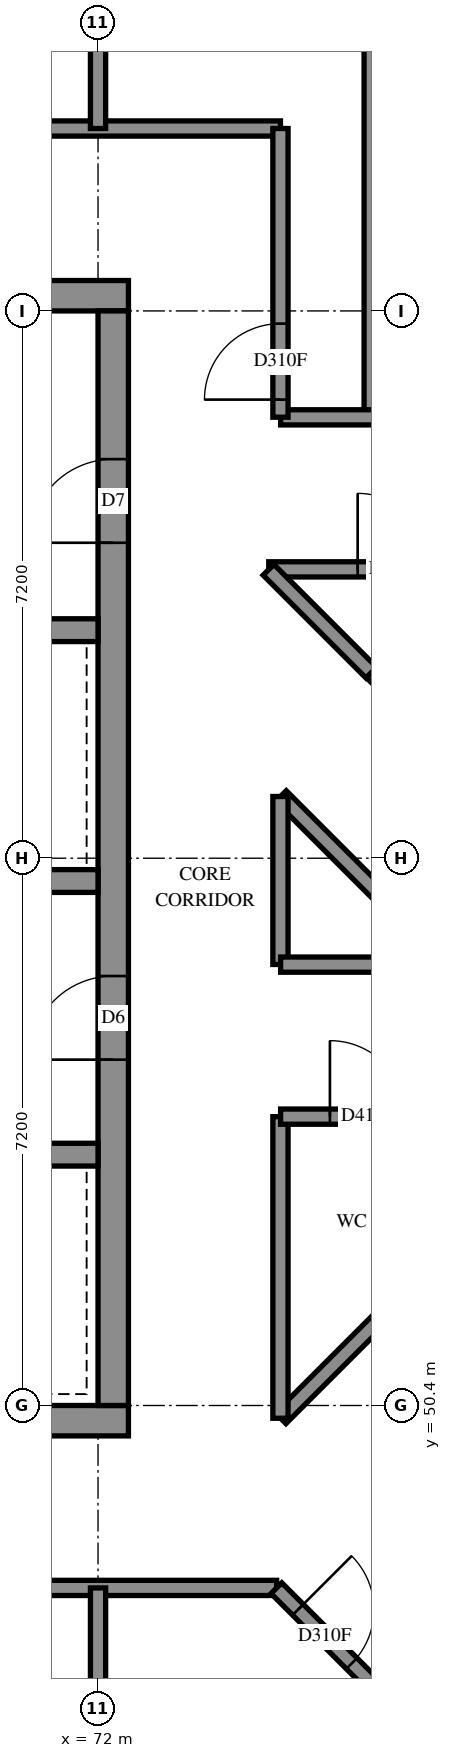
"""IFC4 building model, lengths in metres.
Left out: names, types, materials, properties, quantities, classifications, styles, units other than length and angle.
Written with IfcOpenShell. Run it as: python <this file> out.ifc"""

import sys

from ifc_helpers import new_model, si_unit, direction, frame, frame_2d, origin, place, context, subcontext, project, spatial, rectangle, extrude, element, fill, save


model = new_model("IFC4")
c1 = context("Model", 3, precision=1e-05, world=origin(), true_north=direction((0.0, 1.0)))
c2 = subcontext(c1, "Body", "Model", "MODEL_VIEW")
j1 = project(units=[si_unit("LENGTHUNIT", "METRE"), si_unit("PLANEANGLEUNIT", "RADIAN")], contexts=[c1])
p1 = place(None, origin())
s1 = spatial("IfcSite", under=j1, at=p1, CompositionType="ELEMENT")
p2 = place(p1, origin())
s2 = spatial("IfcBuilding", under=s1, at=p2, CompositionType="ELEMENT")
p3 = place(p2, frame((0.0, 0.0, 250.6)))
s3 = spatial("IfcBuildingStorey", under=s2, at=p3, CompositionType="ELEMENT", Elevation=250.6)
p4 = place(p3, frame((57.2, 50.2, -0.3), z_axis=(0.0, 0.0, 1.0), x_axis=(1.0, 0.0, 0.0)))
e1 = element("IfcWall", 1, at=p4, inside=s3, PredefinedType="SHEAR", context=c2, shape_type="SweptSolid", body=[
    extrude(rectangle(XDim=15.2, YDim=0.4, at=frame_2d((7.6, 0.0))), origin(), (0.0, 0.0, 1.0), 2.7),
])
p5 = place(p3, frame((57.2, 65.0, -0.3), z_axis=(0.0, 0.0, 1.0), x_axis=(1.0, 0.0, 0.0)))
e2 = element("IfcWall", 2, at=p5, inside=s3, PredefinedType="SHEAR", context=c2, shape_type="SweptSolid", body=[
    extrude(rectangle(XDim=15.2, YDim=0.4, at=frame_2d((7.6, 0.0))), origin(), (0.0, 0.0, 1.0), 2.7),
])
p6 = place(p5, frame((10.4, 0.0, 0.3)))
e3 = element("IfcOpeningElement", 3, at=p6, cuts=e2, PredefinedType="OPENING", context=c2, shape_type="SweptSolid", body=[
    extrude(rectangle(XDim=0.8, YDim=2.1, at=frame_2d((0.4, 1.05))), frame((0.0, 0.21, 0.0), z_axis=(0.0, -1.0, 0.0), x_axis=(1.0, 0.0, 0.0)), (0.0, 0.0, 1.0), 0.42),
])
p7 = place(p3, frame((72.2, 50.4, -0.3), z_axis=(0.0, 0.0, 1.0), x_axis=(0.0, 1.0, 0.0)))
e4 = element("IfcWall", 4, at=p7, inside=s3, PredefinedType="SHEAR", context=c2, shape_type="SweptSolid", body=[
    extrude(rectangle(XDim=14.4, YDim=0.4, at=frame_2d((7.2, 0.0))), origin(), (0.0, 0.0, 1.0), 2.7),
])
p8 = place(p7, frame((4.55, 0.0, 0.3)))
e5 = element("IfcOpeningElement", 5, at=p8, cuts=e4, PredefinedType="OPENING", context=c2, shape_type="SweptSolid", body=[
    extrude(rectangle(XDim=1.1, YDim=2.1, at=frame_2d((0.55, 1.05))), frame((0.0, 0.21, 0.0), z_axis=(0.0, -1.0, 0.0), x_axis=(1.0, 0.0, 0.0)), (0.0, 0.0, 1.0), 0.42),
])
p9 = place(p7, frame((11.35, 0.0, 0.3)))
e6 = element("IfcOpeningElement", 6, at=p9, cuts=e4, PredefinedType="OPENING", context=c2, shape_type="SweptSolid", body=[
    extrude(rectangle(XDim=1.1, YDim=2.1, at=frame_2d((0.55, 1.05))), frame((0.0, 0.21, 0.0), z_axis=(0.0, -1.0, 0.0), x_axis=(1.0, 0.0, 0.0)), (0.0, 0.0, 1.0), 0.42),
])
p10 = place(p3, frame((57.6, 53.7, 0.0), z_axis=(0.0, 0.0, 1.0), x_axis=(1.0, 0.0, 0.0)))
e7 = element("IfcWall", 7, at=p10, inside=s3, PredefinedType="SOLIDWALL", context=c2, shape_type="SweptSolid", body=[
    extrude(rectangle(XDim=14.4, YDim=0.3, at=frame_2d((7.2, 0.0))), origin(), (0.0, 0.0, 1.0), 3.1),
])
p11 = place(p10, frame((1.35, 0.0, 0.0)))
e8 = element("IfcOpeningElement", 8, at=p11, cuts=e7, PredefinedType="OPENING", context=c2, shape_type="SweptSolid", body=[
    extrude(rectangle(XDim=0.9, YDim=2.1, at=frame_2d((0.45, 1.05))), frame((0.0, 0.16, 0.0), z_axis=(0.0, -1.0, 0.0), x_axis=(1.0, 0.0, 0.0)), (0.0, 0.0, 1.0), 0.32),
])
p12 = place(p10, frame((4.95, 0.0, 0.0)))
e9 = element("IfcOpeningElement", 9, at=p12, cuts=e7, PredefinedType="OPENING", context=c2, shape_type="SweptSolid", body=[
    extrude(rectangle(XDim=0.9, YDim=2.1, at=frame_2d((0.45, 1.05))), frame((0.0, 0.16, 0.0), z_axis=(0.0, -1.0, 0.0), x_axis=(1.0, 0.0, 0.0)), (0.0, 0.0, 1.0), 0.32),
])
p13 = place(p10, frame((8.55, 0.0, 0.0)))
e10 = element("IfcOpeningElement", 10, at=p13, cuts=e7, PredefinedType="OPENING", context=c2, shape_type="SweptSolid", body=[
    extrude(rectangle(XDim=0.9, YDim=2.1, at=frame_2d((0.45, 1.05))), frame((0.0, 0.16, 0.0), z_axis=(0.0, -1.0, 0.0), x_axis=(1.0, 0.0, 0.0)), (0.0, 0.0, 1.0), 0.32),
])
p14 = place(p10, frame((12.05, 0.0, 0.0)))
e11 = element("IfcOpeningElement", 11, at=p14, cuts=e7, PredefinedType="OPENING", context=c2, shape_type="SweptSolid", body=[
    extrude(rectangle(XDim=1.1, YDim=2.1, at=frame_2d((0.55, 1.05))), frame((0.0, 0.16, 0.0), z_axis=(0.0, -1.0, 0.0), x_axis=(1.0, 0.0, 0.0)), (0.0, 0.0, 1.0), 0.32),
])
p15 = place(p3, frame((57.6, 57.3, 0.0), z_axis=(0.0, 0.0, 1.0), x_axis=(1.0, 0.0, 0.0)))
e12 = element("IfcWall", 12, at=p15, inside=s3, PredefinedType="SOLIDWALL", context=c2, shape_type="SweptSolid", body=[
    extrude(rectangle(XDim=14.4, YDim=0.3, at=frame_2d((7.2, 0.0))), origin(), (0.0, 0.0, 1.0), 3.1),
])
p16 = place(p15, frame((8.55, 0.0, 0.0)))
e13 = element("IfcOpeningElement", 13, at=p16, cuts=e12, PredefinedType="OPENING", context=c2, shape_type="SweptSolid", body=[
    extrude(rectangle(XDim=0.9, YDim=2.1, at=frame_2d((0.45, 1.05))), frame((0.0, 0.16, 0.0), z_axis=(0.0, -1.0, 0.0), x_axis=(1.0, 0.0, 0.0)), (0.0, 0.0, 1.0), 0.32),
])
p17 = place(p15, frame((1.25, 0.0, 0.0)))
e14 = element("IfcOpeningElement", 14, at=p17, cuts=e12, PredefinedType="OPENING", context=c2, shape_type="SweptSolid", body=[
    extrude(rectangle(XDim=1.1, YDim=2.1, at=frame_2d((0.55, 1.05))), frame((0.0, 0.16, 0.0), z_axis=(0.0, -1.0, 0.0), x_axis=(1.0, 0.0, 0.0)), (0.0, 0.0, 1.0), 0.32),
])
p18 = place(p15, frame((4.85, 0.0, 0.0)))
e15 = element("IfcOpeningElement", 15, at=p18, cuts=e12, PredefinedType="OPENING", context=c2, shape_type="SweptSolid", body=[
    extrude(rectangle(XDim=1.1, YDim=2.1, at=frame_2d((0.55, 1.05))), frame((0.0, 0.16, 0.0), z_axis=(0.0, -1.0, 0.0), x_axis=(1.0, 0.0, 0.0)), (0.0, 0.0, 1.0), 0.32),
])
p19 = place(p15, frame((12.05, 0.0, 0.0)))
e16 = element("IfcOpeningElement", 16, at=p19, cuts=e12, PredefinedType="OPENING", context=c2, shape_type="SweptSolid", body=[
    extrude(rectangle(XDim=1.1, YDim=2.1, at=frame_2d((0.55, 1.05))), frame((0.0, 0.16, 0.0), z_axis=(0.0, -1.0, 0.0), x_axis=(1.0, 0.0, 0.0)), (0.0, 0.0, 1.0), 0.32),
])
p20 = place(p3, frame((64.8, 60.6, 0.0), z_axis=(0.0, 0.0, 1.0), x_axis=(1.0, 0.0, 0.0)))
e17 = element("IfcWall", 17, at=p20, inside=s3, PredefinedType="SOLIDWALL", context=c2, shape_type="SweptSolid", body=[
    extrude(rectangle(XDim=7.2, YDim=0.3, at=frame_2d((3.6, 0.0))), origin(), (0.0, 0.0, 1.0), 3.1),
])
p21 = place(p3, frame((55.2, 67.2, 0.0), z_axis=(0.0, 0.0, 1.0), x_axis=(1.0, 0.0, 0.0)))
e18 = element("IfcWall", 18, at=p21, inside=s3, PredefinedType="PARTITIONING", context=c2, shape_type="SweptSolid", body=[
    extrude(rectangle(XDim=19.2, YDim=0.2, at=frame_2d((9.6, 0.0))), origin(), (0.0, 0.0, 1.0), 3.1),
])
p22 = place(p21, frame((6.299, 0.0, 0.0)))
e19 = element("IfcOpeningElement", 19, at=p22, cuts=e18, PredefinedType="OPENING", context=c2, shape_type="SweptSolid", body=[
    extrude(rectangle(XDim=0.9, YDim=2.1, at=frame_2d((0.45, 1.05))), frame((0.0, 0.11, 0.0), z_axis=(0.0, -1.0, 0.0), x_axis=(1.0, 0.0, 0.0)), (0.0, 0.0, 1.0), 0.22),
])
p23 = place(p21, frame((13.65, 0.0, 0.0)))
e20 = element("IfcOpeningElement", 20, at=p23, cuts=e18, PredefinedType="OPENING", context=c2, shape_type="SweptSolid", body=[
    extrude(rectangle(XDim=0.9, YDim=2.1, at=frame_2d((0.45, 1.05))), frame((0.0, 0.11, 0.0), z_axis=(0.0, -1.0, 0.0), x_axis=(1.0, 0.0, 0.0)), (0.0, 0.0, 1.0), 0.22),
])
p24 = place(p3, frame((55.2, 48.0, 0.0), z_axis=(0.0, 0.0, 1.0), x_axis=(1.0, 0.0, 0.0)))
e21 = element("IfcWall", 21, at=p24, inside=s3, PredefinedType="PARTITIONING", context=c2, shape_type="SweptSolid", body=[
    extrude(rectangle(XDim=19.15, YDim=0.2, at=frame_2d((9.575, 0.0))), origin(), (0.0, 0.0, 1.0), 3.1),
])
p25 = place(p24, frame((6.299, 0.0, 0.0)))
e22 = element("IfcOpeningElement", 22, at=p25, cuts=e21, PredefinedType="OPENING", context=c2, shape_type="SweptSolid", body=[
    extrude(rectangle(XDim=0.9, YDim=2.1, at=frame_2d((0.45, 1.05))), frame((0.0, 0.11, 0.0), z_axis=(0.0, -1.0, 0.0), x_axis=(1.0, 0.0, 0.0)), (0.0, 0.0, 1.0), 0.22),
])
p26 = place(p24, frame((13.499, 0.0, 0.0)))
e23 = element("IfcOpeningElement", 23, at=p26, cuts=e21, PredefinedType="OPENING", context=c2, shape_type="SweptSolid", body=[
    extrude(rectangle(XDim=0.9, YDim=2.1, at=frame_2d((0.45, 1.05))), frame((0.0, 0.11, 0.0), z_axis=(0.0, -1.0, 0.0), x_axis=(1.0, 0.0, 0.0)), (0.0, 0.0, 1.0), 0.22),
])
p27 = place(p3, frame((75.6, 63.4, 0.0), z_axis=(0.0, 0.0, 1.0), x_axis=(0.0, 1.0, 0.0)))
e24 = element("IfcWall", 24, at=p27, inside=s3, PredefinedType="PARTITIONING", context=c2, shape_type="SweptSolid", body=[
    extrude(rectangle(XDim=9.412, YDim=0.2, at=frame_2d((4.706, 0.0))), origin(), (0.0, 0.0, 1.0), 3.1),
])
p28 = place(p3, frame((74.401, 50.233, 0.0), z_axis=(0.0, 0.0, 1.0), x_axis=(0.7071067812, 0.7071067812, 0.0)))
e25 = element("IfcWall", 25, at=p28, inside=s3, PredefinedType="PARTITIONING", context=c2, shape_type="SweptSolid", body=[
    extrude(rectangle(XDim=5.609, YDim=0.2, at=frame_2d((2.804, 0.0))), origin(), (0.0, 0.0, 1.0), 3.1),
])
p29 = place(p3, frame((74.246, 61.4, 0.0), z_axis=(0.0, 0.0, 1.0), x_axis=(1.0, 0.0, 0.0)))
e26 = element("IfcWall", 26, at=p29, inside=s3, PredefinedType="PARTITIONING", context=c2, shape_type="SweptSolid", body=[
    extrude(rectangle(XDim=4.954, YDim=0.2, at=frame_2d((2.477, 0.0))), origin(), (0.0, 0.0, 1.0), 3.1),
])
p30 = place(p29, frame((1.17, 0.0, 0.0)))
e27 = element("IfcOpeningElement", 27, at=p30, cuts=e26, PredefinedType="OPENING", context=c2, shape_type="SweptSolid", body=[
    extrude(rectangle(XDim=1.0, YDim=2.1, at=frame_2d((0.5, 1.05))), frame((0.0, 0.11, 0.0), z_axis=(0.0, -1.0, 0.0), x_axis=(1.0, 0.0, 0.0)), (0.0, 0.0, 1.0), 0.22),
])
p31 = place(p3, frame((74.402, 63.4, 0.0), z_axis=(0.0, 0.0, 1.0), x_axis=(1.0, 0.0, 0.0)))
e28 = element("IfcWall", 28, at=p31, inside=s3, PredefinedType="PARTITIONING", context=c2, shape_type="SweptSolid", body=[
    extrude(rectangle(XDim=4.798, YDim=0.2, at=frame_2d((2.399, 0.0))), origin(), (0.0, 0.0, 1.0), 3.1),
])
p32 = place(p31, frame((1.766, 0.0, 0.0)))
e29 = element("IfcOpeningElement", 29, at=p32, cuts=e28, PredefinedType="OPENING", context=c2, shape_type="SweptSolid", body=[
    extrude(rectangle(XDim=1.0, YDim=2.1, at=frame_2d((0.5, 1.05))), frame((0.0, 0.11, 0.0), z_axis=(0.0, -1.0, 0.0), x_axis=(1.0, 0.0, 0.0)), (0.0, 0.0, 1.0), 0.22),
])
p33 = place(p3, frame((74.347, 47.997, 0.0), z_axis=(0.0, 0.0, 1.0), x_axis=(0.7071067812, -0.7071067812, 0.0)))
e30 = element("IfcWall", 30, at=p33, inside=s3, PredefinedType="PARTITIONING", context=c2, shape_type="SweptSolid", body=[
    extrude(rectangle(XDim=4.596, YDim=0.2, at=frame_2d((2.298, 0.0))), origin(), (0.0, 0.0, 1.0), 3.1),
])
p34 = place(p33, frame((0.401, 0.0, 0.0)))
e31 = element("IfcOpeningElement", 31, at=p34, cuts=e30, PredefinedType="OPENING", context=c2, shape_type="SweptSolid", body=[
    extrude(rectangle(XDim=1.0, YDim=2.1, at=frame_2d((0.5, 1.05))), frame((0.0, 0.11, 0.0), z_axis=(0.0, -1.0, 0.0), x_axis=(1.0, 0.0, 0.0)), (0.0, 0.0, 1.0), 0.22),
])
p35 = place(p3, frame((72.0, 43.55, 0.0), z_axis=(0.0, 0.0, 1.0), x_axis=(0.0, 1.0, 0.0)))
e32 = element("IfcWall", 32, at=p35, inside=s3, PredefinedType="PARTITIONING", context=c2, shape_type="SweptSolid", body=[
    extrude(rectangle(XDim=4.45, YDim=0.2, at=frame_2d((2.225, 0.0))), origin(), (0.0, 0.0, 1.0), 3.1),
])
p36 = place(p3, frame((72.0, 67.2, 0.0), z_axis=(0.0, 0.0, 1.0), x_axis=(0.0, 1.0, 0.0)))
e33 = element("IfcWall", 33, at=p36, inside=s3, PredefinedType="PARTITIONING", context=c2, shape_type="SweptSolid", body=[
    extrude(rectangle(XDim=4.346, YDim=0.2, at=frame_2d((2.173, 0.0))), origin(), (0.0, 0.0, 1.0), 3.1),
])
p37 = place(p3, frame((74.4, 50.232, 0.0), z_axis=(0.0, 0.0, 1.0), x_axis=(0.0, 1.0, 0.0)))
e34 = element("IfcWall", 34, at=p37, inside=s3, PredefinedType="PARTITIONING", context=c2, shape_type="SweptSolid", body=[
    extrude(rectangle(XDim=3.968, YDim=0.2, at=frame_2d((1.984, 0.0))), origin(), (0.0, 0.0, 1.0), 3.1),
])
p38 = place(p3, frame((74.402, 54.2, 0.0), z_axis=(0.0, 0.0, 1.0), x_axis=(1.0, 0.0, 0.0)))
e35 = element("IfcWall", 35, at=p38, inside=s3, PredefinedType="PARTITIONING", context=c2, shape_type="SweptSolid", body=[
    extrude(rectangle(XDim=3.966, YDim=0.2, at=frame_2d((1.983, 0.0))), origin(), (0.0, 0.0, 1.0), 3.1),
])
p39 = place(p38, frame((0.649, 0.0, 0.0)))
e36 = element("IfcOpeningElement", 36, at=p39, cuts=e35, PredefinedType="OPENING", context=c2, shape_type="SweptSolid", body=[
    extrude(rectangle(XDim=1.0, YDim=2.1, at=frame_2d((0.5, 1.05))), frame((0.0, 0.11, 0.0), z_axis=(0.0, -1.0, 0.0), x_axis=(1.0, 0.0, 0.0)), (0.0, 0.0, 1.0), 0.22),
])
p40 = place(p3, frame((74.4, 63.402, 0.0), z_axis=(0.0, 0.0, 1.0), x_axis=(0.0, 1.0, 0.0)))
e37 = element("IfcWall", 37, at=p40, inside=s3, PredefinedType="PARTITIONING", context=c2, shape_type="SweptSolid", body=[
    extrude(rectangle(XDim=3.798, YDim=0.2, at=frame_2d((1.899, 0.0))), origin(), (0.0, 0.0, 1.0), 3.1),
])
p41 = place(p40, frame((0.231, 0.0, 0.0)))
e38 = element("IfcOpeningElement", 38, at=p41, cuts=e37, PredefinedType="OPENING", context=c2, shape_type="SweptSolid", body=[
    extrude(rectangle(XDim=1.0, YDim=2.1, at=frame_2d((0.5, 1.05))), frame((0.0, 0.11, 0.0), z_axis=(0.0, -1.0, 0.0), x_axis=(1.0, 0.0, 0.0)), (0.0, 0.0, 1.0), 0.22),
])
p42 = place(p3, frame((74.406, 58.417, 0.0), z_axis=(0.0, 0.0, 1.0), x_axis=(0.7071067812, -0.7071067812, 0.0)))
e39 = element("IfcWall", 39, at=p42, inside=s3, PredefinedType="PARTITIONING", context=c2, shape_type="SweptSolid", body=[
    extrude(rectangle(XDim=3.128, YDim=0.2, at=frame_2d((1.564, 0.0))), origin(), (0.0, 0.0, 1.0), 3.1),
])
for number, where, z_axis, x_axis in (
    (40, (74.4, 56.202, 0.0), (0.0, 0.0, 1.0), (0.0, 1.0, 0.0)),
    (41, (74.402, 56.2, 0.0), (0.0, 0.0, 1.0), (1.0, 0.0, 0.0)),
):
    element("IfcWall", number, at=place(p3, frame(where, z_axis=z_axis, x_axis=x_axis)), inside=s3, PredefinedType="PARTITIONING", context=c2, shape_type="SweptSolid", body=[
        extrude(rectangle(XDim=2.21, YDim=0.2, at=frame_2d((1.105, 0.0))), origin(), (0.0, 0.0, 1.0), 3.1),
    ])
p43 = place(p3, frame((74.243, 61.395, 0.0), z_axis=(0.0, 0.0, 1.0), x_axis=(0.7071067812, -0.7071067812, 0.0)))
e42 = element("IfcWall", 42, at=p43, inside=s3, PredefinedType="PARTITIONING", context=c2, shape_type="SweptSolid", body=[
    extrude(rectangle(XDim=1.915, YDim=0.2, at=frame_2d((0.957, 0.0))), origin(), (0.0, 0.0, 1.0), 3.1),
])
p44 = place(p3, frame((75.602, 60.046, 0.0), z_axis=(0.0, 0.0, 1.0), x_axis=(0.7063318703, -0.7078808437, 0.0)))
e43 = element("IfcWall", 43, at=p44, inside=s3, PredefinedType="PARTITIONING", context=c2, shape_type="SweptSolid", body=[
    extrude(rectangle(XDim=1.291, YDim=0.2, at=frame_2d((0.646, 0.0))), origin(), (0.0, 0.0, 1.0), 3.1),
])
p45 = place(p8, origin())
e44 = element("IfcDoor", 44, at=p45, inside=s3, OperationType="DOUBLE_DOOR_SINGLE_SWING", PredefinedType="DOOR", context=c2, shape_type="SweptSolid", body=[
    extrude(rectangle(XDim=1.1, YDim=2.1, at=frame_2d((0.55, 1.05))), frame((0.0, 0.025, 0.0), z_axis=(0.0, -1.0, 0.0), x_axis=(1.0, 0.0, 0.0)), (0.0, 0.0, 1.0), 0.05),
])
fill(e5, e44)
p46 = place(p9, origin())
e45 = element("IfcDoor", 45, at=p46, inside=s3, OperationType="SINGLE_SWING_RIGHT", PredefinedType="DOOR", context=c2, shape_type="SweptSolid", body=[
    extrude(rectangle(XDim=1.1, YDim=2.1, at=frame_2d((0.55, 1.05))), frame((0.0, 0.025, 0.0), z_axis=(0.0, -1.0, 0.0), x_axis=(1.0, 0.0, 0.0)), (0.0, 0.0, 1.0), 0.05),
])
fill(e6, e45)
p47 = place(p34, origin())
e46 = element("IfcDoor", 46, at=p47, inside=s3, OperationType="SINGLE_SWING_LEFT", PredefinedType="DOOR", context=c2, shape_type="SweptSolid", body=[
    extrude(rectangle(XDim=1.0, YDim=2.1, at=frame_2d((0.5, 1.05))), frame((0.0, 0.025, 0.0), z_axis=(0.0, -1.0, 0.0), x_axis=(1.0, 0.0, 0.0)), (0.0, 0.0, 1.0), 0.05),
])
fill(e31, e46)
p48 = place(p39, origin())
e47 = element("IfcDoor", 47, at=p48, inside=s3, OperationType="SINGLE_SWING_RIGHT", PredefinedType="DOOR", context=c2, shape_type="SweptSolid", body=[
    extrude(rectangle(XDim=1.0, YDim=2.1, at=frame_2d((0.5, 1.05))), frame((0.0, 0.025, 0.0), z_axis=(0.0, -1.0, 0.0), x_axis=(1.0, 0.0, 0.0)), (0.0, 0.0, 1.0), 0.05),
])
fill(e36, e47)
p49 = place(p41, origin())
e48 = element("IfcDoor", 48, at=p49, inside=s3, OperationType="SINGLE_SWING_RIGHT", PredefinedType="DOOR", context=c2, shape_type="SweptSolid", body=[
    extrude(rectangle(XDim=1.0, YDim=2.1, at=frame_2d((0.5, 1.05))), frame((0.0, 0.025, 0.0), z_axis=(0.0, -1.0, 0.0), x_axis=(1.0, 0.0, 0.0)), (0.0, 0.0, 1.0), 0.05),
])
fill(e38, e48)
p50 = place(p30, origin())
e49 = element("IfcDoor", 49, at=p50, inside=s3, OperationType="SINGLE_SWING_RIGHT", PredefinedType="DOOR", context=c2, shape_type="SweptSolid", body=[
    extrude(rectangle(XDim=1.0, YDim=2.1, at=frame_2d((0.5, 1.05))), frame((0.0, 0.025, 0.0), z_axis=(0.0, -1.0, 0.0), x_axis=(1.0, 0.0, 0.0)), (0.0, 0.0, 1.0), 0.05),
])
fill(e27, e49)
save(model, sys.argv[1])
